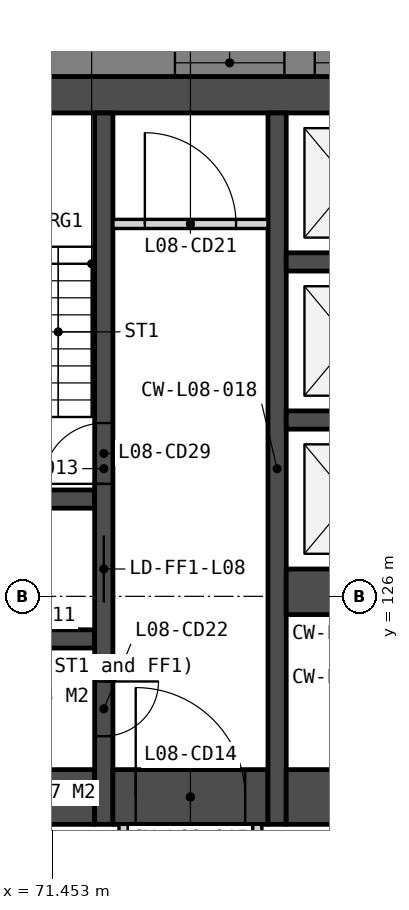
"""IFC4 building model, lengths in metres.
Left out: names, types, materials, properties, quantities, classifications, styles, units other than length and angle.
Written with IfcOpenShell. Run it as: python <this file> out.ifc"""

import sys

from ifc_helpers import new_model, si_unit, direction, frame, frame_2d, origin, place, context, subcontext, project, spatial, polyline, rectangle, outline, extrude, element, fill, save


model = new_model("IFC4")
c1 = context("Model", 3, precision=1e-05, world=origin(), true_north=direction((0.0, 1.0)))
c2 = subcontext(c1, "Body", "Model", "MODEL_VIEW")
j1 = project(units=[si_unit("LENGTHUNIT", "METRE"), si_unit("PLANEANGLEUNIT", "RADIAN")], contexts=[c1])
p1 = place(None, origin())
s1 = spatial("IfcSite", under=j1, at=p1, CompositionType="ELEMENT")
p2 = place(p1, origin())
s2 = spatial("IfcBuilding", under=s1, at=p2, CompositionType="ELEMENT")
p3 = place(p2, frame((0.0, 0.0, 42.0)))
s3 = spatial("IfcBuildingStorey", under=s2, at=p3, CompositionType="ELEMENT", Elevation=42.0)
p4 = place(p3, frame((66.0, 134.25, 0.0), z_axis=(0.0, 0.0, 1.0), x_axis=(1.0, 0.0, 0.0)))
e1 = element("IfcWall", 1, at=p4, inside=s3, PredefinedType="SOLIDWALL", context=c2, shape_type="SweptSolid", body=[
    extrude(rectangle(XDim=28.0, YDim=0.6, at=frame_2d((14.0, 0.0))), origin(), (0.0, 0.0, 1.0), 3.35),
])
for number, where, z_axis, x_axis in (
    (2, (69.6, 127.6, 0.0), (0.0, 0.0, 1.0), (1.0, 0.0, 0.0)),
    (3, (69.6, 125.3, 0.0), (0.0, 0.0, 1.0), (1.0, 0.0, 0.0)),
):
    element("IfcWall", number, at=place(p3, frame(where, z_axis=z_axis, x_axis=x_axis)), inside=s3, PredefinedType="SOLIDWALL", context=c2, shape_type="SweptSolid", body=[
        extrude(rectangle(XDim=2.55, YDim=0.3, at=frame_2d((1.275, 0.0))), origin(), (0.0, 0.0, 1.0), 3.35),
    ])
p5 = place(p3, frame((69.6, 122.7, 0.0), z_axis=(0.0, 0.0, 1.0), x_axis=(1.0, 0.0, 0.0)))
e4 = element("IfcWall", 4, at=p5, inside=s3, PredefinedType="SOLIDWALL", context=c2, shape_type="SweptSolid", body=[
    extrude(rectangle(XDim=2.55, YDim=0.9, at=frame_2d((1.275, 0.0))), origin(), (0.0, 0.0, 1.0), 3.35),
])
p6 = place(p3, frame((72.3, 133.95, 0.0), z_axis=(0.0, 0.0, 1.0), x_axis=(0.0, -1.0, 0.0)))
e5 = element("IfcWall", 5, at=p6, inside=s3, PredefinedType="SOLIDWALL", context=c2, shape_type="SweptSolid", body=[
    extrude(rectangle(XDim=11.7, YDim=0.3, at=frame_2d((5.85, 0.0))), origin(), (0.0, 0.0, 1.0), 3.35),
])
p7 = place(p6, frame((6.95, 0.0, 0.0)))
e6 = element("IfcOpeningElement", 6, at=p7, cuts=e5, PredefinedType="OPENING", context=c2, shape_type="SweptSolid", body=[
    extrude(rectangle(XDim=1.1, YDim=2.1, at=frame_2d((0.55, 1.05))), frame((0.0, 0.16, 0.0), z_axis=(0.0, -1.0, 0.0), x_axis=(1.0, 0.0, 0.0)), (0.0, 0.0, 1.0), 0.32),
])
p8 = place(p6, frame((9.35, 0.0, 0.0)))
e7 = element("IfcOpeningElement", 7, at=p8, cuts=e5, PredefinedType="OPENING", context=c2, shape_type="SweptSolid", body=[
    extrude(rectangle(XDim=0.9, YDim=2.1, at=frame_2d((0.45, 1.05))), frame((0.0, 0.16, 0.0), z_axis=(0.0, -1.0, 0.0), x_axis=(1.0, 0.0, 0.0)), (0.0, 0.0, 1.0), 0.32),
])
p9 = place(p6, frame((5.1, 0.0, 0.0)))
e8 = element("IfcOpeningElement", 8, at=p9, cuts=e5, PredefinedType="OPENING", context=c2, shape_type="SweptSolid", body=[
    extrude(rectangle(XDim=1.0, YDim=2.1, at=frame_2d((0.5, 1.05))), frame((0.0, 0.16, 0.0), z_axis=(0.0, -1.0, 0.0), x_axis=(1.0, 0.0, 0.0)), (0.0, 0.0, 1.0), 0.32),
])
p10 = place(p3, frame((72.45, 132.125, 0.0), z_axis=(0.0, 0.0, 1.0), x_axis=(1.0, 0.0, 0.0)))
e9 = element("IfcWall", 9, at=p10, inside=s3, PredefinedType="PARTITIONING", context=c2, shape_type="SweptSolid", body=[
    extrude(rectangle(XDim=2.55, YDim=0.15, at=frame_2d((1.275, 0.0))), origin(), (0.0, 0.0, 1.0), 3.35),
])
p11 = place(p10, frame((0.525, 0.0, 0.0)))
e10 = element("IfcOpeningElement", 10, at=p11, cuts=e9, PredefinedType="OPENING", context=c2, shape_type="SweptSolid", body=[
    extrude(rectangle(XDim=1.5, YDim=2.1, at=frame_2d((0.75, 1.05))), frame((0.0, 0.085, 0.0), z_axis=(0.0, -1.0, 0.0), x_axis=(1.0, 0.0, 0.0)), (0.0, 0.0, 1.0), 0.17),
])
p12 = place(p3, frame((72.45, 122.7, 0.0), z_axis=(0.0, 0.0, 1.0), x_axis=(1.0, 0.0, 0.0)))
e11 = element("IfcWall", 11, at=p12, inside=s3, PredefinedType="SOLIDWALL", context=c2, shape_type="SweptSolid", body=[
    extrude(rectangle(XDim=2.55, YDim=0.9, at=frame_2d((1.275, 0.0))), origin(), (0.0, 0.0, 1.0), 3.35),
])
p13 = place(p12, frame((0.375, 0.0, 0.0)))
e12 = element("IfcOpeningElement", 12, at=p13, cuts=e11, PredefinedType="OPENING", context=c2, shape_type="SweptSolid", body=[
    extrude(rectangle(XDim=1.8, YDim=2.1, at=frame_2d((0.9, 1.05))), frame((0.0, 0.46, 0.0), z_axis=(0.0, -1.0, 0.0), x_axis=(1.0, 0.0, 0.0)), (0.0, 0.0, 1.0), 0.92),
])
for number, where, z_axis, x_axis in (
    (13, (72.625, 122.25, 0.0), (0.0, 0.0, 1.0), (0.0, -1.0, 0.0)),
    (14, (74.825, 122.25, 0.0), (0.0, 0.0, 1.0), (0.0, -1.0, 0.0)),
):
    element("IfcWall", number, at=place(p3, frame(where, z_axis=z_axis, x_axis=x_axis)), inside=s3, PredefinedType="PARTITIONING", context=c2, shape_type="SweptSolid", body=[
        extrude(rectangle(XDim=2.1, YDim=0.15, at=frame_2d((1.05, 0.0))), origin(), (0.0, 0.0, 1.0), 3.35),
    ])
p14 = place(p3, frame((75.15, 133.95, 0.0), z_axis=(0.0, 0.0, 1.0), x_axis=(0.0, -1.0, 0.0)))
e15 = element("IfcWall", 15, at=p14, inside=s3, PredefinedType="SOLIDWALL", context=c2, shape_type="SweptSolid", body=[
    extrude(rectangle(XDim=11.7, YDim=0.3, at=frame_2d((5.85, 0.0))), origin(), (0.0, 0.0, 1.0), 3.35),
])
for number, where, z_axis, x_axis in (
    (16, (75.3, 131.5, 0.0), (0.0, 0.0, 1.0), (1.0, 0.0, 0.0)),
    (17, (75.3, 128.9, 0.0), (0.0, 0.0, 1.0), (1.0, 0.0, 0.0)),
):
    element("IfcWall", number, at=place(p3, frame(where, z_axis=z_axis, x_axis=x_axis)), inside=s3, PredefinedType="SOLIDWALL", context=c2, shape_type="SweptSolid", body=[
        extrude(rectangle(XDim=2.1, YDim=0.3, at=frame_2d((1.05, 0.0))), origin(), (0.0, 0.0, 1.0), 3.35),
    ])
p15 = place(p3, frame((75.3, 126.075, 0.0), z_axis=(0.0, 0.0, 1.0), x_axis=(1.0, 0.0, 0.0)))
e18 = element("IfcWall", 18, at=p15, inside=s3, PredefinedType="SOLIDWALL", context=c2, shape_type="SweptSolid", body=[
    extrude(rectangle(XDim=2.1, YDim=0.75, at=frame_2d((1.05, 0.0))), origin(), (0.0, 0.0, 1.0), 3.35),
])
p16 = place(p3, frame((75.3, 122.7, 0.0), z_axis=(0.0, 0.0, 1.0), x_axis=(1.0, 0.0, 0.0)))
e19 = element("IfcWall", 19, at=p16, inside=s3, PredefinedType="SOLIDWALL", context=c2, shape_type="SweptSolid", body=[
    extrude(rectangle(XDim=6.2, YDim=0.9, at=frame_2d((3.1, 0.0))), origin(), (0.0, 0.0, 1.0), 3.35),
])
p17 = place(p3, frame((102.4, 134.775, -0.15), z_axis=(0.0, 0.0, 1.0), x_axis=(-1.0, 0.0, 0.0)))
e20 = element("IfcWall", 20, at=p17, inside=s3, PredefinedType="SOLIDWALL", context=c2, shape_type="SweptSolid", body=[
    extrude(outline(polyline([(44.8, 0.0), (44.8, 3.5), (0.0, 3.5), (0.0, 0.0), (44.8, 0.0)])), frame((0.0, 0.225, 0.0), z_axis=(0.0, -1.0, 0.0), x_axis=(1.0, 0.0, 0.0)), (0.0, 0.0, 1.0), 0.45),
])
p18 = place(p17, frame((0.786, 0.0, 1.05)))
e21 = element("IfcOpeningElement", 21, at=p18, cuts=e20, PredefinedType="OPENING", context=c2, shape_type="SweptSolid", body=[
    extrude(rectangle(XDim=1.2, YDim=1.5, at=frame_2d((0.6, 0.75))), frame((0.0, 0.235, 0.0), z_axis=(0.0, -1.0, 0.0), x_axis=(1.0, 0.0, 0.0)), (0.0, 0.0, 1.0), 0.47),
])
p19 = place(p17, frame((6.91, 0.0, 1.05)))
e22 = element("IfcOpeningElement", 22, at=p19, cuts=e20, PredefinedType="OPENING", context=c2, shape_type="SweptSolid", body=[
    extrude(rectangle(XDim=1.8, YDim=1.5, at=frame_2d((0.9, 0.75))), frame((0.0, 0.235, 0.0), z_axis=(0.0, -1.0, 0.0), x_axis=(1.0, 0.0, 0.0)), (0.0, 0.0, 1.0), 0.47),
])
p20 = place(p17, frame((9.21, 0.0, 1.05)))
e23 = element("IfcOpeningElement", 23, at=p20, cuts=e20, PredefinedType="OPENING", context=c2, shape_type="SweptSolid", body=[
    extrude(rectangle(XDim=1.8, YDim=1.5, at=frame_2d((0.9, 0.75))), frame((0.0, 0.235, 0.0), z_axis=(0.0, -1.0, 0.0), x_axis=(1.0, 0.0, 0.0)), (0.0, 0.0, 1.0), 0.47),
])
p21 = place(p17, frame((15.87, 0.0, 1.05)))
e24 = element("IfcOpeningElement", 24, at=p21, cuts=e20, PredefinedType="OPENING", context=c2, shape_type="SweptSolid", body=[
    extrude(rectangle(XDim=1.8, YDim=1.5, at=frame_2d((0.9, 0.75))), frame((0.0, 0.235, 0.0), z_axis=(0.0, -1.0, 0.0), x_axis=(1.0, 0.0, 0.0)), (0.0, 0.0, 1.0), 0.47),
])
p22 = place(p17, frame((18.17, 0.0, 1.05)))
e25 = element("IfcOpeningElement", 25, at=p22, cuts=e20, PredefinedType="OPENING", context=c2, shape_type="SweptSolid", body=[
    extrude(rectangle(XDim=1.8, YDim=1.5, at=frame_2d((0.9, 0.75))), frame((0.0, 0.235, 0.0), z_axis=(0.0, -1.0, 0.0), x_axis=(1.0, 0.0, 0.0)), (0.0, 0.0, 1.0), 0.47),
])
p23 = place(p17, frame((24.83, 0.0, 1.05)))
e26 = element("IfcOpeningElement", 26, at=p23, cuts=e20, PredefinedType="OPENING", context=c2, shape_type="SweptSolid", body=[
    extrude(rectangle(XDim=1.8, YDim=1.5, at=frame_2d((0.9, 0.75))), frame((0.0, 0.235, 0.0), z_axis=(0.0, -1.0, 0.0), x_axis=(1.0, 0.0, 0.0)), (0.0, 0.0, 1.0), 0.47),
])
p24 = place(p17, frame((27.13, 0.0, 1.05)))
e27 = element("IfcOpeningElement", 27, at=p24, cuts=e20, PredefinedType="OPENING", context=c2, shape_type="SweptSolid", body=[
    extrude(rectangle(XDim=1.8, YDim=1.5, at=frame_2d((0.9, 0.75))), frame((0.0, 0.235, 0.0), z_axis=(0.0, -1.0, 0.0), x_axis=(1.0, 0.0, 0.0)), (0.0, 0.0, 1.0), 0.47),
])
p25 = place(p17, frame((33.79, 0.0, 1.05)))
e28 = element("IfcOpeningElement", 28, at=p25, cuts=e20, PredefinedType="OPENING", context=c2, shape_type="SweptSolid", body=[
    extrude(rectangle(XDim=1.8, YDim=1.5, at=frame_2d((0.9, 0.75))), frame((0.0, 0.235, 0.0), z_axis=(0.0, -1.0, 0.0), x_axis=(1.0, 0.0, 0.0)), (0.0, 0.0, 1.0), 0.47),
])
p26 = place(p17, frame((36.09, 0.0, 1.05)))
e29 = element("IfcOpeningElement", 29, at=p26, cuts=e20, PredefinedType="OPENING", context=c2, shape_type="SweptSolid", body=[
    extrude(rectangle(XDim=1.8, YDim=1.5, at=frame_2d((0.9, 0.75))), frame((0.0, 0.235, 0.0), z_axis=(0.0, -1.0, 0.0), x_axis=(1.0, 0.0, 0.0)), (0.0, 0.0, 1.0), 0.47),
])
p27 = place(p17, frame((42.814, 0.0, 1.05)))
e30 = element("IfcOpeningElement", 30, at=p27, cuts=e20, PredefinedType="OPENING", context=c2, shape_type="SweptSolid", body=[
    extrude(rectangle(XDim=1.2, YDim=1.5, at=frame_2d((0.6, 0.75))), frame((0.0, 0.235, 0.0), z_axis=(0.0, -1.0, 0.0), x_axis=(1.0, 0.0, 0.0)), (0.0, 0.0, 1.0), 0.47),
])
p28 = place(p3, frame((54.495, 129.397, -0.15), z_axis=(0.0, 0.0, 1.0), x_axis=(0.499999201451, -0.866025864826, 0.0)))
e31 = element("IfcWall", 31, at=p28, inside=s3, PredefinedType="SOLIDWALL", context=c2, shape_type="SweptSolid", body=[
    extrude(outline(polyline([(44.8, 0.0), (44.8, 3.5), (0.0, 3.5), (0.0, 0.0), (44.8, 0.0)])), frame((0.0, 0.225, 0.0), z_axis=(0.0, -1.0, 0.0), x_axis=(1.0, 0.0, 0.0)), (0.0, 0.0, 1.0), 0.45),
])
p29 = place(p28, frame((0.786, 0.0, 1.05)))
e32 = element("IfcOpeningElement", 32, at=p29, cuts=e31, PredefinedType="OPENING", context=c2, shape_type="SweptSolid", body=[
    extrude(rectangle(XDim=1.2, YDim=1.5, at=frame_2d((0.6, 0.75))), frame((0.0, 0.235, 0.0), z_axis=(0.0, -1.0, 0.0), x_axis=(1.0, 0.0, 0.0)), (0.0, 0.0, 1.0), 0.47),
])
p30 = place(p28, frame((6.91, 0.0, 1.05)))
e33 = element("IfcOpeningElement", 33, at=p30, cuts=e31, PredefinedType="OPENING", context=c2, shape_type="SweptSolid", body=[
    extrude(rectangle(XDim=1.8, YDim=1.5, at=frame_2d((0.9, 0.75))), frame((0.0, 0.235, 0.0), z_axis=(0.0, -1.0, 0.0), x_axis=(1.0, 0.0, 0.0)), (0.0, 0.0, 1.0), 0.47),
])
p31 = place(p28, frame((9.21, 0.0, 1.05)))
e34 = element("IfcOpeningElement", 34, at=p31, cuts=e31, PredefinedType="OPENING", context=c2, shape_type="SweptSolid", body=[
    extrude(rectangle(XDim=1.8, YDim=1.5, at=frame_2d((0.9, 0.75))), frame((0.0, 0.235, 0.0), z_axis=(0.0, -1.0, 0.0), x_axis=(1.0, 0.0, 0.0)), (0.0, 0.0, 1.0), 0.47),
])
p32 = place(p28, frame((15.87, 0.0, 1.05)))
e35 = element("IfcOpeningElement", 35, at=p32, cuts=e31, PredefinedType="OPENING", context=c2, shape_type="SweptSolid", body=[
    extrude(rectangle(XDim=1.8, YDim=1.5, at=frame_2d((0.9, 0.75))), frame((0.0, 0.235, 0.0), z_axis=(0.0, -1.0, 0.0), x_axis=(1.0, 0.0, 0.0)), (0.0, 0.0, 1.0), 0.47),
])
p33 = place(p28, frame((18.17, 0.0, 1.05)))
e36 = element("IfcOpeningElement", 36, at=p33, cuts=e31, PredefinedType="OPENING", context=c2, shape_type="SweptSolid", body=[
    extrude(rectangle(XDim=1.8, YDim=1.5, at=frame_2d((0.9, 0.75))), frame((0.0, 0.235, 0.0), z_axis=(0.0, -1.0, 0.0), x_axis=(1.0, 0.0, 0.0)), (0.0, 0.0, 1.0), 0.47),
])
p34 = place(p28, frame((24.83, 0.0, 1.05)))
e37 = element("IfcOpeningElement", 37, at=p34, cuts=e31, PredefinedType="OPENING", context=c2, shape_type="SweptSolid", body=[
    extrude(rectangle(XDim=1.8, YDim=1.5, at=frame_2d((0.9, 0.75))), frame((0.0, 0.235, 0.0), z_axis=(0.0, -1.0, 0.0), x_axis=(1.0, 0.0, 0.0)), (0.0, 0.0, 1.0), 0.47),
])
p35 = place(p28, frame((27.13, 0.0, 1.05)))
e38 = element("IfcOpeningElement", 38, at=p35, cuts=e31, PredefinedType="OPENING", context=c2, shape_type="SweptSolid", body=[
    extrude(rectangle(XDim=1.8, YDim=1.5, at=frame_2d((0.9, 0.75))), frame((0.0, 0.235, 0.0), z_axis=(0.0, -1.0, 0.0), x_axis=(1.0, 0.0, 0.0)), (0.0, 0.0, 1.0), 0.47),
])
p36 = place(p28, frame((33.79, 0.0, 1.05)))
e39 = element("IfcOpeningElement", 39, at=p36, cuts=e31, PredefinedType="OPENING", context=c2, shape_type="SweptSolid", body=[
    extrude(rectangle(XDim=1.8, YDim=1.5, at=frame_2d((0.9, 0.75))), frame((0.0, 0.235, 0.0), z_axis=(0.0, -1.0, 0.0), x_axis=(1.0, 0.0, 0.0)), (0.0, 0.0, 1.0), 0.47),
])
p37 = place(p28, frame((36.09, 0.0, 1.05)))
e40 = element("IfcOpeningElement", 40, at=p37, cuts=e31, PredefinedType="OPENING", context=c2, shape_type="SweptSolid", body=[
    extrude(rectangle(XDim=1.8, YDim=1.5, at=frame_2d((0.9, 0.75))), frame((0.0, 0.235, 0.0), z_axis=(0.0, -1.0, 0.0), x_axis=(1.0, 0.0, 0.0)), (0.0, 0.0, 1.0), 0.47),
])
p38 = place(p28, frame((42.814, 0.0, 1.05)))
e41 = element("IfcOpeningElement", 41, at=p38, cuts=e31, PredefinedType="OPENING", context=c2, shape_type="SweptSolid", body=[
    extrude(rectangle(XDim=1.2, YDim=1.5, at=frame_2d((0.6, 0.75))), frame((0.0, 0.235, 0.0), z_axis=(0.0, -1.0, 0.0), x_axis=(1.0, 0.0, 0.0)), (0.0, 0.0, 1.0), 0.47),
])
p39 = place(p7, origin())
e42 = element("IfcDoor", 42, at=p39, inside=s3, OperationType="SLIDING_TO_LEFT", PredefinedType="DOOR", context=c2, shape_type="SweptSolid", body=[
    extrude(rectangle(XDim=1.1, YDim=2.1, at=frame_2d((0.55, 1.05))), frame((0.0, 0.025, 0.0), z_axis=(0.0, -1.0, 0.0), x_axis=(1.0, 0.0, 0.0)), (0.0, 0.0, 1.0), 0.05),
])
fill(e6, e42)
p40 = place(p13, origin())
e43 = element("IfcDoor", 43, at=p40, inside=s3, OperationType="DOUBLE_DOOR_DOUBLE_SWING", PredefinedType="DOOR", context=c2, shape_type="SweptSolid", body=[
    extrude(rectangle(XDim=1.8, YDim=2.1, at=frame_2d((0.9, 1.05))), frame((0.0, 0.025, 0.0), z_axis=(0.0, -1.0, 0.0), x_axis=(1.0, 0.0, 0.0)), (0.0, 0.0, 1.0), 0.05),
])
fill(e12, e43)
p41 = place(p11, origin())
e44 = element("IfcDoor", 44, at=p41, inside=s3, OperationType="DOUBLE_DOOR_DOUBLE_SWING", PredefinedType="DOOR", context=c2, shape_type="SweptSolid", body=[
    extrude(rectangle(XDim=1.5, YDim=2.1, at=frame_2d((0.75, 1.05))), frame((0.0, 0.025, 0.0), z_axis=(0.0, -1.0, 0.0), x_axis=(1.0, 0.0, 0.0)), (0.0, 0.0, 1.0), 0.05),
])
fill(e10, e44)
p42 = place(p8, origin())
e45 = element("IfcDoor", 45, at=p42, inside=s3, OperationType="SINGLE_SWING_LEFT", PredefinedType="DOOR", context=c2, shape_type="SweptSolid", body=[
    extrude(rectangle(XDim=0.9, YDim=2.1, at=frame_2d((0.45, 1.05))), frame((0.0, 0.025, 0.0), z_axis=(0.0, -1.0, 0.0), x_axis=(1.0, 0.0, 0.0)), (0.0, 0.0, 1.0), 0.05),
])
fill(e7, e45)
p43 = place(p9, origin())
e46 = element("IfcDoor", 46, at=p43, inside=s3, OperationType="SINGLE_SWING_RIGHT", PredefinedType="DOOR", context=c2, shape_type="SweptSolid", body=[
    extrude(rectangle(XDim=1.0, YDim=2.1, at=frame_2d((0.5, 1.05))), frame((0.0, 0.025, 0.0), z_axis=(0.0, -1.0, 0.0), x_axis=(1.0, 0.0, 0.0)), (0.0, 0.0, 1.0), 0.05),
])
fill(e8, e46)
p44 = place(p23, origin())
e47 = element("IfcWindow", 47, at=p44, inside=s3, PartitioningType="SINGLE_PANEL", PredefinedType="WINDOW", context=c2, shape_type="SweptSolid", body=[
    extrude(rectangle(XDim=1.8, YDim=1.5, at=frame_2d((0.9, 0.75))), frame((0.0, 0.03, 0.0), z_axis=(0.0, -1.0, 0.0), x_axis=(1.0, 0.0, 0.0)), (0.0, 0.0, 1.0), 0.06),
])
fill(e26, e47)
p45 = place(p24, origin())
e48 = element("IfcWindow", 48, at=p45, inside=s3, PartitioningType="SINGLE_PANEL", PredefinedType="WINDOW", context=c2, shape_type="SweptSolid", body=[
    extrude(rectangle(XDim=1.8, YDim=1.5, at=frame_2d((0.9, 0.75))), frame((0.0, 0.03, 0.0), z_axis=(0.0, -1.0, 0.0), x_axis=(1.0, 0.0, 0.0)), (0.0, 0.0, 1.0), 0.06),
])
fill(e27, e48)
save(model, sys.argv[1])
